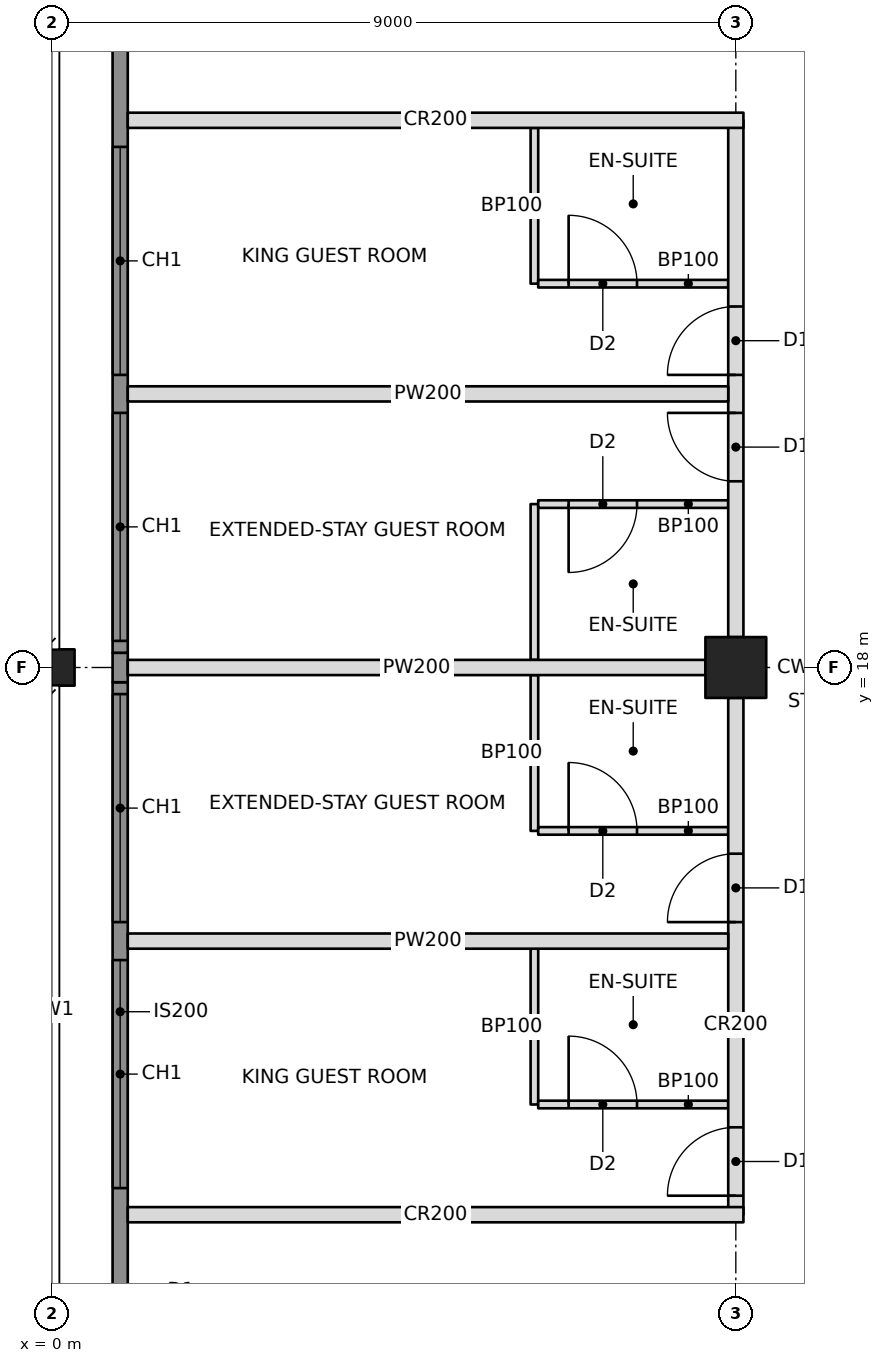
"""IFC4 building model, lengths in metres.
Left out: names, types, materials, properties, quantities, classifications, styles, units other than length and angle.
Written with IfcOpenShell. Run it as: python <this file> out.ifc"""

import sys

from ifc_helpers import new_model, si_unit, direction, frame, frame_2d, origin, origin_2d, place, context, subcontext, project, spatial, rectangle, hollow_rectangle, i_section, extrude, element, fill, save


model = new_model("IFC4")
c1 = context("Model", 3, precision=1e-05, world=origin(), true_north=direction((0.0, 1.0)))
c2 = subcontext(c1, "Body", "Model", "MODEL_VIEW")
j1 = project(units=[si_unit("LENGTHUNIT", "METRE"), si_unit("PLANEANGLEUNIT", "RADIAN")], contexts=[c1])
p1 = place(None, origin())
s1 = spatial("IfcSite", under=j1, at=p1, CompositionType="ELEMENT")
p2 = place(p1, origin())
s2 = spatial("IfcBuilding", under=s1, at=p2, CompositionType="ELEMENT")
p3 = place(p2, frame((0.0, 0.0, 51.8)))
s3 = spatial("IfcBuildingStorey", under=s2, at=p3, CompositionType="ELEMENT", Elevation=51.8)
p4 = place(p3, frame((0.0, 18.0, 0.0), z_axis=(0.0, 0.0, 1.0), x_axis=(0.0, 1.0, 0.0)))
e1 = element("IfcColumn", 1, at=p4, inside=s3, PredefinedType="COLUMN", context=c2, shape_type="SweptSolid", body=[
    extrude(i_section(OverallWidth=0.478, OverallDepth=0.599, WebThickness=0.1, FlangeThickness=0.14, at=origin_2d()), origin(), (0.0, 0.0, 1.0), 3.4),
])
p5 = place(p3, frame((9.0, 18.0, 0.0), z_axis=(0.0, 0.0, 1.0), x_axis=(1.0, 0.0, 0.0)))
e2 = element("IfcColumn", 2, at=p5, inside=s3, PredefinedType="COLUMN", context=c2, shape_type="SweptSolid", body=[
    extrude(hollow_rectangle(XDim=0.8, YDim=0.8, WallThickness=0.1, at=origin_2d()), origin(), (0.0, 0.0, 1.0), 3.4),
])
p6 = place(p3, frame((9.0, 10.8, 0.0), z_axis=(0.0, 0.0, 1.0), x_axis=(0.0, 1.0, 0.0)))
e3 = element("IfcWall", 3, at=p6, inside=s3, PredefinedType="PARTITIONING", context=c2, shape_type="SweptSolid", body=[
    extrude(rectangle(XDim=6.8, YDim=0.2, at=frame_2d((3.4, 0.0))), origin(), (0.0, 0.0, 1.0), 2.405),
])
p7 = place(p6, frame((0.25, 0.0, 0.0)))
e4 = element("IfcOpeningElement", 4, at=p7, cuts=e3, PredefinedType="OPENING", context=c2, shape_type="SweptSolid", body=[
    extrude(rectangle(XDim=0.9, YDim=2.1, at=frame_2d((0.45, 1.05))), frame((0.0, 0.11, 0.0), z_axis=(0.0, -1.0, 0.0), x_axis=(1.0, 0.0, 0.0)), (0.0, 0.0, 1.0), 0.22),
])
p8 = place(p6, frame((3.85, 0.0, 0.0)))
e5 = element("IfcOpeningElement", 5, at=p8, cuts=e3, PredefinedType="OPENING", context=c2, shape_type="SweptSolid", body=[
    extrude(rectangle(XDim=0.9, YDim=2.1, at=frame_2d((0.45, 1.05))), frame((0.0, 0.11, 0.0), z_axis=(0.0, -1.0, 0.0), x_axis=(1.0, 0.0, 0.0)), (0.0, 0.0, 1.0), 0.22),
])
p9 = place(p3, frame((9.0, 18.4, 0.0), z_axis=(0.0, 0.0, 1.0), x_axis=(0.0, 1.0, 0.0)))
e6 = element("IfcWall", 6, at=p9, inside=s3, PredefinedType="PARTITIONING", context=c2, shape_type="SweptSolid", body=[
    extrude(rectangle(XDim=6.8, YDim=0.2, at=frame_2d((3.4, 0.0))), origin(), (0.0, 0.0, 1.0), 2.405),
])
p10 = place(p9, frame((2.05, 0.0, 0.0)))
e7 = element("IfcOpeningElement", 7, at=p10, cuts=e6, PredefinedType="OPENING", context=c2, shape_type="SweptSolid", body=[
    extrude(rectangle(XDim=0.9, YDim=2.1, at=frame_2d((0.45, 1.05))), frame((0.0, 0.11, 0.0), z_axis=(0.0, -1.0, 0.0), x_axis=(1.0, 0.0, 0.0)), (0.0, 0.0, 1.0), 0.22),
])
p11 = place(p9, frame((3.45, 0.0, 0.0)))
e8 = element("IfcOpeningElement", 8, at=p11, cuts=e6, PredefinedType="OPENING", context=c2, shape_type="SweptSolid", body=[
    extrude(rectangle(XDim=0.9, YDim=2.1, at=frame_2d((0.45, 1.05))), frame((0.0, 0.11, 0.0), z_axis=(0.0, -1.0, 0.0), x_axis=(1.0, 0.0, 0.0)), (0.0, 0.0, 1.0), 0.22),
])
for number, where, z_axis, x_axis in (
    (9, (1.0, 10.8, 0.0), (0.0, 0.0, 1.0), (1.0, 0.0, 0.0)),
    (10, (1.0, 25.2, 0.0), (0.0, 0.0, 1.0), (1.0, 0.0, 0.0)),
):
    element("IfcWall", number, at=place(p3, frame(where, z_axis=z_axis, x_axis=x_axis)), inside=s3, PredefinedType="PARTITIONING", context=c2, shape_type="SweptSolid", body=[
        extrude(rectangle(XDim=8.1, YDim=0.2, at=frame_2d((4.05, 0.0))), origin(), (0.0, 0.0, 1.0), 2.404),
    ])
p12 = place(p3, frame((8.9, 14.4, 0.0), z_axis=(0.0, 0.0, 1.0), x_axis=(-1.0, 0.0, 0.0)))
e11 = element("IfcWall", 11, at=p12, inside=s3, PredefinedType="PARTITIONING", context=c2, shape_type="SweptSolid", body=[
    extrude(rectangle(XDim=7.9, YDim=0.2, at=frame_2d((3.95, 0.0))), origin(), (0.0, 0.0, 1.0), 2.404),
])
p13 = place(p3, frame((8.6, 18.0, 0.0), z_axis=(0.0, 0.0, 1.0), x_axis=(-1.0, 0.0, 0.0)))
e12 = element("IfcWall", 12, at=p13, inside=s3, PredefinedType="PARTITIONING", context=c2, shape_type="SweptSolid", body=[
    extrude(rectangle(XDim=7.6, YDim=0.2, at=frame_2d((3.8, 0.0))), origin(), (0.0, 0.0, 1.0), 2.405),
])
p14 = place(p3, frame((8.9, 21.6, 0.0), z_axis=(0.0, 0.0, 1.0), x_axis=(-1.0, 0.0, 0.0)))
e13 = element("IfcWall", 13, at=p14, inside=s3, PredefinedType="PARTITIONING", context=c2, shape_type="SweptSolid", body=[
    extrude(rectangle(XDim=7.9, YDim=0.2, at=frame_2d((3.95, 0.0))), origin(), (0.0, 0.0, 1.0), 2.404),
])
p15 = place(p3, frame((6.35, 12.25, 0.0), z_axis=(0.0, 0.0, 1.0), x_axis=(0.0, 1.0, 0.0)))
e14 = element("IfcWall", 14, at=p15, inside=s3, PredefinedType="PARTITIONING", context=c2, shape_type="SweptSolid", body=[
    extrude(rectangle(XDim=2.05, YDim=0.1, at=frame_2d((1.025, 0.0))), origin(), (0.0, 0.0, 1.0), 3.2),
])
p16 = place(p3, frame((8.9, 12.25, 0.0), z_axis=(0.0, 0.0, 1.0), x_axis=(-1.0, 0.0, 0.0)))
e15 = element("IfcWall", 15, at=p16, inside=s3, PredefinedType="PARTITIONING", context=c2, shape_type="SweptSolid", body=[
    extrude(rectangle(XDim=2.5, YDim=0.1, at=frame_2d((1.25, 0.0))), origin(), (0.0, 0.0, 1.0), 2.404),
])
p17 = place(p16, frame((1.2, 0.0, 0.0)))
e16 = element("IfcOpeningElement", 16, at=p17, cuts=e15, PredefinedType="OPENING", context=c2, shape_type="SweptSolid", body=[
    extrude(rectangle(XDim=0.9, YDim=2.1, at=frame_2d((0.45, 1.05))), frame((0.0, 0.06, 0.0), z_axis=(0.0, -1.0, 0.0), x_axis=(1.0, 0.0, 0.0)), (0.0, 0.0, 1.0), 0.12),
])
p18 = place(p3, frame((6.35, 15.85, 0.0), z_axis=(0.0, 0.0, 1.0), x_axis=(0.0, 1.0, 0.0)))
e17 = element("IfcWall", 17, at=p18, inside=s3, PredefinedType="PARTITIONING", context=c2, shape_type="SweptSolid", body=[
    extrude(rectangle(XDim=2.05, YDim=0.1, at=frame_2d((1.025, 0.0))), origin(), (0.0, 0.0, 1.0), 2.404),
])
p19 = place(p3, frame((8.9, 15.85, 0.0), z_axis=(0.0, 0.0, 1.0), x_axis=(-1.0, 0.0, 0.0)))
e18 = element("IfcWall", 18, at=p19, inside=s3, PredefinedType="PARTITIONING", context=c2, shape_type="SweptSolid", body=[
    extrude(rectangle(XDim=2.5, YDim=0.1, at=frame_2d((1.25, 0.0))), origin(), (0.0, 0.0, 1.0), 2.404),
])
p20 = place(p19, frame((1.2, 0.0, 0.0)))
e19 = element("IfcOpeningElement", 19, at=p20, cuts=e18, PredefinedType="OPENING", context=c2, shape_type="SweptSolid", body=[
    extrude(rectangle(XDim=0.9, YDim=2.1, at=frame_2d((0.45, 1.05))), frame((0.0, 0.06, 0.0), z_axis=(0.0, -1.0, 0.0), x_axis=(1.0, 0.0, 0.0)), (0.0, 0.0, 1.0), 0.12),
])
p21 = place(p3, frame((6.35, 18.1, 0.0), z_axis=(0.0, 0.0, 1.0), x_axis=(0.0, 1.0, 0.0)))
e20 = element("IfcWall", 20, at=p21, inside=s3, PredefinedType="PARTITIONING", context=c2, shape_type="SweptSolid", body=[
    extrude(rectangle(XDim=2.05, YDim=0.1, at=frame_2d((1.025, 0.0))), origin(), (0.0, 0.0, 1.0), 2.404),
])
p22 = place(p3, frame((8.9, 20.15, 0.0), z_axis=(0.0, 0.0, 1.0), x_axis=(-1.0, 0.0, 0.0)))
e21 = element("IfcWall", 21, at=p22, inside=s3, PredefinedType="PARTITIONING", context=c2, shape_type="SweptSolid", body=[
    extrude(rectangle(XDim=2.5, YDim=0.1, at=frame_2d((1.25, 0.0))), origin(), (0.0, 0.0, 1.0), 2.404),
])
p23 = place(p22, frame((1.2, 0.0, 0.0)))
e22 = element("IfcOpeningElement", 22, at=p23, cuts=e21, PredefinedType="OPENING", context=c2, shape_type="SweptSolid", body=[
    extrude(rectangle(XDim=0.9, YDim=2.1, at=frame_2d((0.45, 1.05))), frame((0.0, 0.06, 0.0), z_axis=(0.0, -1.0, 0.0), x_axis=(1.0, 0.0, 0.0)), (0.0, 0.0, 1.0), 0.12),
])
p24 = place(p3, frame((6.35, 23.05, 0.0), z_axis=(0.0, 0.0, 1.0), x_axis=(0.0, 1.0, 0.0)))
e23 = element("IfcWall", 23, at=p24, inside=s3, PredefinedType="PARTITIONING", context=c2, shape_type="SweptSolid", body=[
    extrude(rectangle(XDim=2.05, YDim=0.1, at=frame_2d((1.025, 0.0))), origin(), (0.0, 0.0, 1.0), 3.2),
])
p25 = place(p3, frame((8.9, 23.05, 0.0), z_axis=(0.0, 0.0, 1.0), x_axis=(-1.0, 0.0, 0.0)))
e24 = element("IfcWall", 24, at=p25, inside=s3, PredefinedType="PARTITIONING", context=c2, shape_type="SweptSolid", body=[
    extrude(rectangle(XDim=2.5, YDim=0.1, at=frame_2d((1.25, 0.0))), origin(), (0.0, 0.0, 1.0), 2.404),
])
p26 = place(p25, frame((1.2, 0.0, 0.0)))
e25 = element("IfcOpeningElement", 25, at=p26, cuts=e24, PredefinedType="OPENING", context=c2, shape_type="SweptSolid", body=[
    extrude(rectangle(XDim=0.9, YDim=2.1, at=frame_2d((0.45, 1.05))), frame((0.0, 0.06, 0.0), z_axis=(0.0, -1.0, 0.0), x_axis=(1.0, 0.0, 0.0)), (0.0, 0.0, 1.0), 0.12),
])
p27 = place(p3, frame((0.9, 9.135, 0.0), z_axis=(0.0, 0.0, 1.0), x_axis=(0.0, 1.0, 0.0)))
e26 = element("IfcWall", 26, at=p27, inside=s3, PredefinedType="SOLIDWALL", context=c2, shape_type="SweptSolid", body=[
    extrude(rectangle(XDim=8.671, YDim=0.2, at=frame_2d((4.335, 0.0))), origin(), (0.0, 0.0, 1.0), 3.2),
])
p28 = place(p27, frame((2.015, 0.0, 0.6)))
e27 = element("IfcOpeningElement", 27, at=p28, cuts=e26, PredefinedType="OPENING", context=c2, shape_type="SweptSolid", body=[
    extrude(rectangle(XDim=3.0, YDim=2.2, at=frame_2d((1.5, 1.1))), frame((0.0, 0.11, 0.0), z_axis=(0.0, -1.0, 0.0), x_axis=(1.0, 0.0, 0.0)), (0.0, 0.0, 1.0), 0.22),
])
p29 = place(p27, frame((5.515, 0.0, 0.6)))
e28 = element("IfcOpeningElement", 28, at=p29, cuts=e26, PredefinedType="OPENING", context=c2, shape_type="SweptSolid", body=[
    extrude(rectangle(XDim=3.0, YDim=2.2, at=frame_2d((1.5, 1.1))), frame((0.0, 0.11, 0.0), z_axis=(0.0, -1.0, 0.0), x_axis=(1.0, 0.0, 0.0)), (0.0, 0.0, 1.0), 0.22),
])
p30 = place(p3, frame((0.9, 17.806, 0.0), z_axis=(0.0, 0.0, 1.0), x_axis=(0.0, 1.0, 0.0)))
e29 = element("IfcWall", 29, at=p30, inside=s3, PredefinedType="SOLIDWALL", context=c2, shape_type="SweptSolid", body=[
    extrude(rectangle(XDim=0.388, YDim=0.2, at=frame_2d((0.194, 0.0))), origin(), (0.0, 0.0, 1.0), 2.404),
])
p31 = place(p3, frame((0.9, 18.194, 0.0), z_axis=(0.0, 0.0, 1.0), x_axis=(0.0, 1.0, 0.0)))
e30 = element("IfcWall", 30, at=p31, inside=s3, PredefinedType="SOLIDWALL", context=c2, shape_type="SweptSolid", body=[
    extrude(rectangle(XDim=8.671, YDim=0.2, at=frame_2d((4.335, 0.0))), origin(), (0.0, 0.0, 1.0), 3.2),
])
p32 = place(p31, frame((0.156, 0.0, 0.6)))
e31 = element("IfcOpeningElement", 31, at=p32, cuts=e30, PredefinedType="OPENING", context=c2, shape_type="SweptSolid", body=[
    extrude(rectangle(XDim=3.0, YDim=2.2, at=frame_2d((1.5, 1.1))), frame((0.0, 0.11, 0.0), z_axis=(0.0, -1.0, 0.0), x_axis=(1.0, 0.0, 0.0)), (0.0, 0.0, 1.0), 0.22),
])
p33 = place(p31, frame((3.656, 0.0, 0.6)))
e32 = element("IfcOpeningElement", 32, at=p33, cuts=e30, PredefinedType="OPENING", context=c2, shape_type="SweptSolid", body=[
    extrude(rectangle(XDim=3.0, YDim=2.2, at=frame_2d((1.5, 1.1))), frame((0.0, 0.11, 0.0), z_axis=(0.0, -1.0, 0.0), x_axis=(1.0, 0.0, 0.0)), (0.0, 0.0, 1.0), 0.22),
])
p34 = place(p28, origin())
e33 = element("IfcWindow", 33, at=p34, inside=s3, PartitioningType="TRIPLE_PANEL_VERTICAL", PredefinedType="WINDOW", context=c2, shape_type="SweptSolid", body=[
    extrude(rectangle(XDim=3.0, YDim=2.2, at=frame_2d((1.5, 1.1))), frame((0.0, 0.03, 0.0), z_axis=(0.0, -1.0, 0.0), x_axis=(1.0, 0.0, 0.0)), (0.0, 0.0, 1.0), 0.06),
])
fill(e27, e33)
p35 = place(p29, origin())
e34 = element("IfcWindow", 34, at=p35, inside=s3, PartitioningType="TRIPLE_PANEL_VERTICAL", PredefinedType="WINDOW", context=c2, shape_type="SweptSolid", body=[
    extrude(rectangle(XDim=3.0, YDim=2.2, at=frame_2d((1.5, 1.1))), frame((0.0, 0.03, 0.0), z_axis=(0.0, -1.0, 0.0), x_axis=(1.0, 0.0, 0.0)), (0.0, 0.0, 1.0), 0.06),
])
fill(e28, e34)
p36 = place(p32, origin())
e35 = element("IfcWindow", 35, at=p36, inside=s3, PartitioningType="TRIPLE_PANEL_VERTICAL", PredefinedType="WINDOW", context=c2, shape_type="SweptSolid", body=[
    extrude(rectangle(XDim=3.0, YDim=2.2, at=frame_2d((1.5, 1.1))), frame((0.0, 0.03, 0.0), z_axis=(0.0, -1.0, 0.0), x_axis=(1.0, 0.0, 0.0)), (0.0, 0.0, 1.0), 0.06),
])
fill(e31, e35)
p37 = place(p33, origin())
e36 = element("IfcWindow", 36, at=p37, inside=s3, PartitioningType="TRIPLE_PANEL_VERTICAL", PredefinedType="WINDOW", context=c2, shape_type="SweptSolid", body=[
    extrude(rectangle(XDim=3.0, YDim=2.2, at=frame_2d((1.5, 1.1))), frame((0.0, 0.03, 0.0), z_axis=(0.0, -1.0, 0.0), x_axis=(1.0, 0.0, 0.0)), (0.0, 0.0, 1.0), 0.06),
])
fill(e32, e36)
p38 = place(p17, frame((0.9, 0.0, 0.0), z_axis=(0.0, 0.0, 1.0), x_axis=(-1.0, 0.0, 0.0)))
e37 = element("IfcDoor", 37, at=p38, inside=s3, OperationType="SINGLE_SWING_LEFT", PredefinedType="DOOR", context=c2, shape_type="SweptSolid", body=[
    extrude(rectangle(XDim=0.9, YDim=2.1, at=frame_2d((0.45, 1.05))), frame((0.0, 0.025, 0.0), z_axis=(0.0, -1.0, 0.0), x_axis=(1.0, 0.0, 0.0)), (0.0, 0.0, 1.0), 0.05),
])
fill(e16, e37)
p39 = place(p7, origin())
e38 = element("IfcDoor", 38, at=p39, inside=s3, OperationType="SINGLE_SWING_LEFT", PredefinedType="DOOR", context=c2, shape_type="SweptSolid", body=[
    extrude(rectangle(XDim=0.9, YDim=2.1, at=frame_2d((0.45, 1.05))), frame((0.0, 0.025, 0.0), z_axis=(0.0, -1.0, 0.0), x_axis=(1.0, 0.0, 0.0)), (0.0, 0.0, 1.0), 0.05),
])
fill(e4, e38)
p40 = place(p20, frame((0.9, 0.0, 0.0), z_axis=(0.0, 0.0, 1.0), x_axis=(-1.0, 0.0, 0.0)))
e39 = element("IfcDoor", 39, at=p40, inside=s3, OperationType="SINGLE_SWING_LEFT", PredefinedType="DOOR", context=c2, shape_type="SweptSolid", body=[
    extrude(rectangle(XDim=0.9, YDim=2.1, at=frame_2d((0.45, 1.05))), frame((0.0, 0.025, 0.0), z_axis=(0.0, -1.0, 0.0), x_axis=(1.0, 0.0, 0.0)), (0.0, 0.0, 1.0), 0.05),
])
fill(e19, e39)
p41 = place(p8, origin())
e40 = element("IfcDoor", 40, at=p41, inside=s3, OperationType="SINGLE_SWING_LEFT", PredefinedType="DOOR", context=c2, shape_type="SweptSolid", body=[
    extrude(rectangle(XDim=0.9, YDim=2.1, at=frame_2d((0.45, 1.05))), frame((0.0, 0.025, 0.0), z_axis=(0.0, -1.0, 0.0), x_axis=(1.0, 0.0, 0.0)), (0.0, 0.0, 1.0), 0.05),
])
fill(e5, e40)
p42 = place(p23, origin())
e41 = element("IfcDoor", 41, at=p42, inside=s3, OperationType="SINGLE_SWING_RIGHT", PredefinedType="DOOR", context=c2, shape_type="SweptSolid", body=[
    extrude(rectangle(XDim=0.9, YDim=2.1, at=frame_2d((0.45, 1.05))), frame((0.0, 0.025, 0.0), z_axis=(0.0, -1.0, 0.0), x_axis=(1.0, 0.0, 0.0)), (0.0, 0.0, 1.0), 0.05),
])
fill(e22, e41)
p43 = place(p10, origin())
e42 = element("IfcDoor", 42, at=p43, inside=s3, OperationType="SINGLE_SWING_RIGHT", PredefinedType="DOOR", context=c2, shape_type="SweptSolid", body=[
    extrude(rectangle(XDim=0.9, YDim=2.1, at=frame_2d((0.45, 1.05))), frame((0.0, 0.025, 0.0), z_axis=(0.0, -1.0, 0.0), x_axis=(1.0, 0.0, 0.0)), (0.0, 0.0, 1.0), 0.05),
])
fill(e7, e42)
p44 = place(p26, frame((0.9, 0.0, 0.0), z_axis=(0.0, 0.0, 1.0), x_axis=(-1.0, 0.0, 0.0)))
e43 = element("IfcDoor", 43, at=p44, inside=s3, OperationType="SINGLE_SWING_LEFT", PredefinedType="DOOR", context=c2, shape_type="SweptSolid", body=[
    extrude(rectangle(XDim=0.9, YDim=2.1, at=frame_2d((0.45, 1.05))), frame((0.0, 0.025, 0.0), z_axis=(0.0, -1.0, 0.0), x_axis=(1.0, 0.0, 0.0)), (0.0, 0.0, 1.0), 0.05),
])
fill(e25, e43)
p45 = place(p11, origin())
e44 = element("IfcDoor", 44, at=p45, inside=s3, OperationType="SINGLE_SWING_LEFT", PredefinedType="DOOR", context=c2, shape_type="SweptSolid", body=[
    extrude(rectangle(XDim=0.9, YDim=2.1, at=frame_2d((0.45, 1.05))), frame((0.0, 0.025, 0.0), z_axis=(0.0, -1.0, 0.0), x_axis=(1.0, 0.0, 0.0)), (0.0, 0.0, 1.0), 0.05),
])
fill(e8, e44)
save(model, sys.argv[1])
